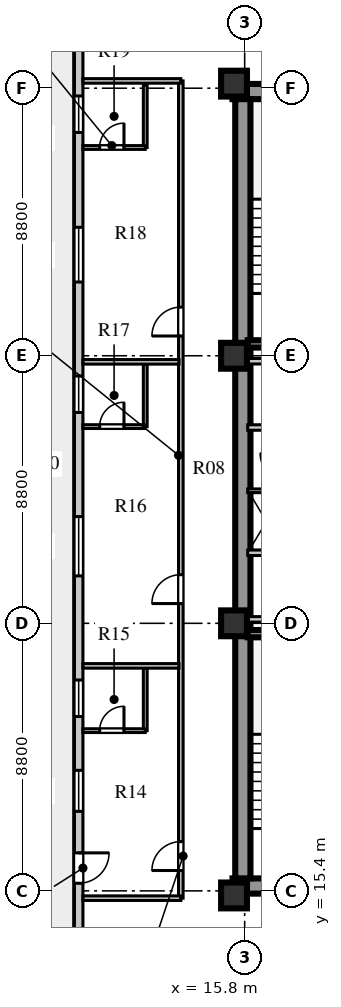
"""IFC4 building model, lengths in metres.
Left out: names, types, materials, properties, quantities, classifications, styles, units other than length and angle.
Written with IfcOpenShell. Run it as: python <this file> out.ifc"""

import sys

from ifc_helpers import new_model, si_unit, direction, frame, frame_2d, origin, origin_2d, place, context, subcontext, project, spatial, rectangle, extrude, element, fill, save


model = new_model("IFC4")
c1 = context("Model", 3, precision=1e-05, world=origin(), true_north=direction((0.0, 1.0)))
c2 = subcontext(c1, "Body", "Model", "MODEL_VIEW")
j1 = project(units=[si_unit("LENGTHUNIT", "METRE"), si_unit("PLANEANGLEUNIT", "RADIAN")], contexts=[c1])
p1 = place(None, origin())
s1 = spatial("IfcSite", under=j1, at=p1, CompositionType="ELEMENT")
p2 = place(p1, origin())
s2 = spatial("IfcBuilding", under=s1, at=p2, CompositionType="ELEMENT")
p3 = place(p2, frame((0.0, 0.0, 127.1)))
s3 = spatial("IfcBuildingStorey", under=s2, at=p3, CompositionType="ELEMENT", Elevation=127.1)
for number, where, z_axis, x_axis in (
    (1, (15.4, 15.56, 0.0), (0.0, 0.0, 1.0), (1.0, 0.0, 0.0)),
    (2, (15.4, 41.69, 0.0), (0.0, 0.0, 1.0), (1.0, 0.0, 0.0)),
):
    element("IfcWall", number, at=place(p3, frame(where, z_axis=z_axis, x_axis=x_axis)), inside=s3, PredefinedType="SHEAR", context=c2, shape_type="SweptSolid", body=[
        extrude(rectangle(XDim=9.68, YDim=0.5, at=frame_2d((4.84, 0.0))), origin(), (0.0, 0.0, 1.0), 3.6),
    ])
p4 = place(p3, frame((15.74, 15.81, 0.0), z_axis=(0.0, 0.0, 1.0), x_axis=(0.0, 1.0, 0.0)))
e3 = element("IfcWall", 3, at=p4, inside=s3, PredefinedType="SHEAR", context=c2, shape_type="SweptSolid", body=[
    extrude(rectangle(XDim=25.63, YDim=0.5, at=frame_2d((12.815, 0.0))), origin(), (0.0, 0.0, 1.0), 3.6),
])
for number, where, z_axis, x_axis in (
    (4, (15.45, 15.25, 0.0), (0.0, 0.0, 1.0), (1.0, 0.0, 0.0)),
    (5, (15.45, 24.2, 0.0), (0.0, 0.0, 1.0), (1.0, 0.0, 0.0)),
    (6, (15.45, 33.0, 0.0), (0.0, 0.0, 1.0), (1.0, 0.0, 0.0)),
    (7, (15.45, 41.95, 0.0), (0.0, 0.0, 1.0), (1.0, 0.0, 0.0)),
):
    element("IfcColumn", number, at=place(p3, frame(where, z_axis=z_axis, x_axis=x_axis)), inside=s3, PredefinedType="COLUMN", context=c2, shape_type="SweptSolid", body=[
        extrude(rectangle(XDim=0.85, YDim=0.85, at=origin_2d()), origin(), (0.0, 0.0, 1.0), 3.6),
    ])
p5 = place(p3, frame((10.34, 43.87, 0.0), z_axis=(0.0, 0.0, 1.0), x_axis=(0.0, -1.0, 0.0)))
e8 = element("IfcWall", 8, at=p5, inside=s3, PredefinedType="STANDARD", context=c2, shape_type="SweptSolid", body=[
    extrude(rectangle(XDim=30.54, YDim=0.28, at=frame_2d((15.27, 0.0))), origin(), (0.0, 0.0, 1.0), 3.6),
])
p6 = place(p5, frame((27.22, 0.0, 0.0)))
e9 = element("IfcOpeningElement", 9, at=p6, cuts=e8, PredefinedType="OPENING", context=c2, shape_type="SweptSolid", body=[
    extrude(rectangle(XDim=1.0, YDim=2.05, at=frame_2d((0.5, 1.025))), frame((0.0, 0.15, 0.0), z_axis=(0.0, -1.0, 0.0), x_axis=(1.0, 0.0, 0.0)), (0.0, 0.0, 1.0), 0.3),
])
p7 = place(p5, frame((24.505, 0.0, 0.8)))
e10 = element("IfcOpeningElement", 10, at=p7, cuts=e8, PredefinedType="OPENING", context=c2, shape_type="SweptSolid", body=[
    extrude(rectangle(XDim=1.35, YDim=1.9, at=frame_2d((0.675, 0.95))), frame((0.0, 0.15, 0.0), z_axis=(0.0, -1.0, 0.0), x_axis=(1.0, 0.0, 0.0)), (0.0, 0.0, 1.0), 0.3),
])
p8 = place(p5, frame((21.535, 0.0, 0.8)))
e11 = element("IfcOpeningElement", 11, at=p8, cuts=e8, PredefinedType="OPENING", context=c2, shape_type="SweptSolid", body=[
    extrude(rectangle(XDim=1.2, YDim=1.75, at=frame_2d((0.6, 0.875))), frame((0.0, 0.15, 0.0), z_axis=(0.0, -1.0, 0.0), x_axis=(1.0, 0.0, 0.0)), (0.0, 0.0, 1.0), 0.3),
])
p9 = place(p5, frame((16.16, 0.0, 0.8)))
e12 = element("IfcOpeningElement", 12, at=p9, cuts=e8, PredefinedType="OPENING", context=c2, shape_type="SweptSolid", body=[
    extrude(rectangle(XDim=1.95, YDim=2.0, at=frame_2d((0.975, 1.0))), frame((0.0, 0.15, 0.0), z_axis=(0.0, -1.0, 0.0), x_axis=(1.0, 0.0, 0.0)), (0.0, 0.0, 1.0), 0.3),
])
p10 = place(p5, frame((11.535, 0.0, 0.8)))
e13 = element("IfcOpeningElement", 13, at=p10, cuts=e8, PredefinedType="OPENING", context=c2, shape_type="SweptSolid", body=[
    extrude(rectangle(XDim=1.2, YDim=1.75, at=frame_2d((0.6, 0.875))), frame((0.0, 0.15, 0.0), z_axis=(0.0, -1.0, 0.0), x_axis=(1.0, 0.0, 0.0)), (0.0, 0.0, 1.0), 0.3),
])
p11 = place(p5, frame((6.645, 0.0, 0.8)))
e14 = element("IfcOpeningElement", 14, at=p11, cuts=e8, PredefinedType="OPENING", context=c2, shape_type="SweptSolid", body=[
    extrude(rectangle(XDim=1.8, YDim=2.0, at=frame_2d((0.9, 1.0))), frame((0.0, 0.15, 0.0), z_axis=(0.0, -1.0, 0.0), x_axis=(1.0, 0.0, 0.0)), (0.0, 0.0, 1.0), 0.3),
])
p12 = place(p5, frame((2.325, 0.0, 0.8)))
e15 = element("IfcOpeningElement", 15, at=p12, cuts=e8, PredefinedType="OPENING", context=c2, shape_type="SweptSolid", body=[
    extrude(rectangle(XDim=1.2, YDim=1.75, at=frame_2d((0.6, 0.875))), frame((0.0, 0.15, 0.0), z_axis=(0.0, -1.0, 0.0), x_axis=(1.0, 0.0, 0.0)), (0.0, 0.0, 1.0), 0.3),
])
p13 = place(p3, frame((15.9, 23.86, 0.0), z_axis=(0.0, 0.0, 1.0), x_axis=(1.0, 0.0, 0.0)))
e16 = element("IfcWall", 16, at=p13, inside=s3, PredefinedType="SHEAR", context=c2, shape_type="SweptSolid", body=[
    extrude(rectangle(XDim=3.52, YDim=0.24, at=frame_2d((1.76, 0.0))), origin(), (0.0, 0.0, 1.0), 3.85),
])
p14 = place(p3, frame((15.9, 26.52, 0.0), z_axis=(0.0, 0.0, 1.0), x_axis=(1.0, 0.0, 0.0)))
e17 = element("IfcWall", 17, at=p14, inside=s3, PredefinedType="SOLIDWALL", context=c2, shape_type="SweptSolid", body=[
    extrude(rectangle(XDim=8.68, YDim=0.18, at=frame_2d((4.34, 0.0))), origin(), (0.0, 0.0, 1.0), 3.6),
])
p15 = place(p14, frame((3.3, 0.0, 0.0)))
e18 = element("IfcOpeningElement", 18, at=p15, cuts=e17, PredefinedType="OPENING", context=c2, shape_type="SweptSolid", body=[
    extrude(rectangle(XDim=0.95, YDim=2.1, at=frame_2d((0.475, 1.05))), frame((0.0, 0.1, 0.0), z_axis=(0.0, -1.0, 0.0), x_axis=(1.0, 0.0, 0.0)), (0.0, 0.0, 1.0), 0.2),
])
p16 = place(p3, frame((15.9, 24.33, 0.0), z_axis=(0.0, 0.0, 1.0), x_axis=(1.0, 0.0, 0.0)))
e19 = element("IfcWall", 19, at=p16, inside=s3, PredefinedType="SOLIDWALL", context=c2, shape_type="SweptSolid", body=[
    extrude(rectangle(XDim=8.68, YDim=0.18, at=frame_2d((4.34, 0.0))), origin(), (0.0, 0.0, 1.0), 2.95),
])
p17 = place(p3, frame((15.9, 28.56, 0.0), z_axis=(0.0, 0.0, 1.0), x_axis=(1.0, 0.0, 0.0)))
e20 = element("IfcWall", 20, at=p17, inside=s3, PredefinedType="PARTITIONING", context=c2, shape_type="SweptSolid", body=[
    extrude(rectangle(XDim=1.2, YDim=0.12, at=frame_2d((0.6, 0.0))), origin(), (0.0, 0.0, 1.0), 3.6),
])
p18 = place(p3, frame((15.9, 30.64, 0.0), z_axis=(0.0, 0.0, 1.0), x_axis=(1.0, 0.0, 0.0)))
e21 = element("IfcWall", 21, at=p18, inside=s3, PredefinedType="SOLIDWALL", context=c2, shape_type="SweptSolid", body=[
    extrude(rectangle(XDim=8.68, YDim=0.18, at=frame_2d((4.34, 0.0))), origin(), (0.0, 0.0, 1.0), 3.6),
])
p19 = place(p18, frame((1.76, 0.0, 0.0)))
e22 = element("IfcOpeningElement", 22, at=p19, cuts=e21, PredefinedType="OPENING", context=c2, shape_type="SweptSolid", body=[
    extrude(rectangle(XDim=1.0, YDim=2.1, at=frame_2d((0.5, 1.05))), frame((0.0, 0.1, 0.0), z_axis=(0.0, -1.0, 0.0), x_axis=(1.0, 0.0, 0.0)), (0.0, 0.0, 1.0), 0.2),
])
p20 = place(p18, frame((3.6, 0.0, 0.0)))
e23 = element("IfcOpeningElement", 23, at=p20, cuts=e21, PredefinedType="OPENING", context=c2, shape_type="SweptSolid", body=[
    extrude(rectangle(XDim=1.0, YDim=2.1, at=frame_2d((0.5, 1.05))), frame((0.0, 0.1, 0.0), z_axis=(0.0, -1.0, 0.0), x_axis=(1.0, 0.0, 0.0)), (0.0, 0.0, 1.0), 0.2),
])
p21 = place(p18, frame((5.44, 0.0, 0.0)))
e24 = element("IfcOpeningElement", 24, at=p21, cuts=e21, PredefinedType="OPENING", context=c2, shape_type="SweptSolid", body=[
    extrude(rectangle(XDim=1.0, YDim=2.1, at=frame_2d((0.5, 1.05))), frame((0.0, 0.1, 0.0), z_axis=(0.0, -1.0, 0.0), x_axis=(1.0, 0.0, 0.0)), (0.0, 0.0, 1.0), 0.2),
])
p22 = place(p18, frame((7.28, 0.0, 0.0)))
e25 = element("IfcOpeningElement", 25, at=p22, cuts=e21, PredefinedType="OPENING", context=c2, shape_type="SweptSolid", body=[
    extrude(rectangle(XDim=1.0, YDim=2.1, at=frame_2d((0.5, 1.05))), frame((0.0, 0.1, 0.0), z_axis=(0.0, -1.0, 0.0), x_axis=(1.0, 0.0, 0.0)), (0.0, 0.0, 1.0), 0.2),
])
p23 = place(p3, frame((15.9, 32.82, 0.0), z_axis=(0.0, 0.0, 1.0), x_axis=(1.0, 0.0, 0.0)))
e26 = element("IfcWall", 26, at=p23, inside=s3, PredefinedType="SOLIDWALL", context=c2, shape_type="SweptSolid", body=[
    extrude(rectangle(XDim=8.68, YDim=0.18, at=frame_2d((4.34, 0.0))), origin(), (0.0, 0.0, 1.0), 2.95),
])
p24 = place(p3, frame((15.9, 33.39, 0.0), z_axis=(0.0, 0.0, 1.0), x_axis=(1.0, 0.0, 0.0)))
e27 = element("IfcWall", 27, at=p24, inside=s3, PredefinedType="SHEAR", context=c2, shape_type="SweptSolid", body=[
    extrude(rectangle(XDim=3.52, YDim=0.24, at=frame_2d((1.76, 0.0))), origin(), (0.0, 0.0, 1.0), 3.85),
])
p25 = place(p3, frame((13.7, 15.16, 0.0), z_axis=(0.0, 0.0, 1.0), x_axis=(0.0, 1.0, 0.0)))
e28 = element("IfcWall", 28, at=p25, inside=s3, PredefinedType="PARTITIONING", context=c2, shape_type="SweptSolid", body=[
    extrude(rectangle(XDim=26.88, YDim=0.15, at=frame_2d((13.44, 0.0))), origin(), (0.0, 0.0, 1.0), 3.6),
])
p26 = place(p25, frame((0.91, 0.0, 0.0)))
e29 = element("IfcOpeningElement", 29, at=p26, cuts=e28, PredefinedType="OPENING", context=c2, shape_type="SweptSolid", body=[
    extrude(rectangle(XDim=0.95, YDim=2.1, at=frame_2d((0.475, 1.05))), frame((0.0, 0.085, 0.0), z_axis=(0.0, -1.0, 0.0), x_axis=(1.0, 0.0, 0.0)), (0.0, 0.0, 1.0), 0.17),
])
p27 = place(p25, frame((9.69, 0.0, 0.0)))
e30 = element("IfcOpeningElement", 30, at=p27, cuts=e28, PredefinedType="OPENING", context=c2, shape_type="SweptSolid", body=[
    extrude(rectangle(XDim=0.95, YDim=2.1, at=frame_2d((0.475, 1.05))), frame((0.0, 0.085, 0.0), z_axis=(0.0, -1.0, 0.0), x_axis=(1.0, 0.0, 0.0)), (0.0, 0.0, 1.0), 0.17),
])
p28 = place(p25, frame((18.49, 0.0, 0.0)))
e31 = element("IfcOpeningElement", 31, at=p28, cuts=e28, PredefinedType="OPENING", context=c2, shape_type="SweptSolid", body=[
    extrude(rectangle(XDim=0.95, YDim=2.1, at=frame_2d((0.475, 1.05))), frame((0.0, 0.085, 0.0), z_axis=(0.0, -1.0, 0.0), x_axis=(1.0, 0.0, 0.0)), (0.0, 0.0, 1.0), 0.17),
])
for number, where, z_axis, x_axis in (
    (32, (10.48, 15.16, 0.0), (0.0, 0.0, 1.0), (1.0, 0.0, 0.0)),
    (33, (10.48, 42.04, 0.0), (0.0, 0.0, 1.0), (1.0, 0.0, 0.0)),
):
    element("IfcWall", number, at=place(p3, frame(where, z_axis=z_axis, x_axis=x_axis)), inside=s3, PredefinedType="PARTITIONING", context=c2, shape_type="SweptSolid", body=[
        extrude(rectangle(XDim=3.22, YDim=0.15, at=frame_2d((1.61, 0.0))), origin(), (0.0, 0.0, 1.0), 3.1),
    ])
p29 = place(p3, frame((12.53, 20.67, 0.0), z_axis=(0.0, 0.0, 1.0), x_axis=(0.0, 1.0, 0.0)))
e34 = element("IfcWall", 34, at=p29, inside=s3, PredefinedType="PLUMBINGWALL", context=c2, shape_type="SweptSolid", body=[
    extrude(rectangle(XDim=2.05, YDim=0.125, at=frame_2d((1.025, 0.0))), origin(), (0.0, 0.0, 1.0), 3.6),
])
p30 = place(p3, frame((10.48, 20.67, 0.0), z_axis=(0.0, 0.0, 1.0), x_axis=(1.0, 0.0, 0.0)))
e35 = element("IfcWall", 35, at=p30, inside=s3, PredefinedType="PLUMBINGWALL", context=c2, shape_type="SweptSolid", body=[
    extrude(rectangle(XDim=2.05, YDim=0.125, at=frame_2d((1.025, 0.0))), origin(), (0.0, 0.0, 1.0), 3.6),
])
p31 = place(p30, frame((0.55, 0.0, 0.0)))
e36 = element("IfcOpeningElement", 36, at=p31, cuts=e35, PredefinedType="OPENING", context=c2, shape_type="SweptSolid", body=[
    extrude(rectangle(XDim=0.8, YDim=2.05, at=frame_2d((0.4, 1.025))), frame((0.0, 0.073, 0.0), z_axis=(0.0, -1.0, 0.0), x_axis=(1.0, 0.0, 0.0)), (0.0, 0.0, 1.0), 0.145),
])
p32 = place(p3, frame((10.48, 22.8, 0.0), z_axis=(0.0, 0.0, 1.0), x_axis=(1.0, 0.0, 0.0)))
e37 = element("IfcWall", 37, at=p32, inside=s3, PredefinedType="PARTITIONING", context=c2, shape_type="SweptSolid", body=[
    extrude(rectangle(XDim=3.16, YDim=0.15, at=frame_2d((1.58, 0.0))), origin(), (0.0, 0.0, 1.0), 3.6),
])
p33 = place(p3, frame((12.53, 30.67, 0.0), z_axis=(0.0, 0.0, 1.0), x_axis=(0.0, 1.0, 0.0)))
e38 = element("IfcWall", 38, at=p33, inside=s3, PredefinedType="PLUMBINGWALL", context=c2, shape_type="SweptSolid", body=[
    extrude(rectangle(XDim=2.05, YDim=0.125, at=frame_2d((1.025, 0.0))), origin(), (0.0, 0.0, 1.0), 3.6),
])
p34 = place(p3, frame((10.48, 30.67, 0.0), z_axis=(0.0, 0.0, 1.0), x_axis=(1.0, 0.0, 0.0)))
e39 = element("IfcWall", 39, at=p34, inside=s3, PredefinedType="PLUMBINGWALL", context=c2, shape_type="SweptSolid", body=[
    extrude(rectangle(XDim=2.05, YDim=0.125, at=frame_2d((1.025, 0.0))), origin(), (0.0, 0.0, 1.0), 3.6),
])
p35 = place(p34, frame((0.55, 0.0, 0.0)))
e40 = element("IfcOpeningElement", 40, at=p35, cuts=e39, PredefinedType="OPENING", context=c2, shape_type="SweptSolid", body=[
    extrude(rectangle(XDim=0.8, YDim=2.05, at=frame_2d((0.4, 1.025))), frame((0.0, 0.073, 0.0), z_axis=(0.0, -1.0, 0.0), x_axis=(1.0, 0.0, 0.0)), (0.0, 0.0, 1.0), 0.145),
])
p36 = place(p3, frame((10.48, 32.8, 0.0), z_axis=(0.0, 0.0, 1.0), x_axis=(1.0, 0.0, 0.0)))
e41 = element("IfcWall", 41, at=p36, inside=s3, PredefinedType="PARTITIONING", context=c2, shape_type="SweptSolid", body=[
    extrude(rectangle(XDim=3.16, YDim=0.15, at=frame_2d((1.58, 0.0))), origin(), (0.0, 0.0, 1.0), 3.1),
])
p37 = place(p3, frame((12.53, 39.85, 0.0), z_axis=(0.0, 0.0, 1.0), x_axis=(0.0, 1.0, 0.0)))
e42 = element("IfcWall", 42, at=p37, inside=s3, PredefinedType="PLUMBINGWALL", context=c2, shape_type="SweptSolid", body=[
    extrude(rectangle(XDim=2.05, YDim=0.125, at=frame_2d((1.025, 0.0))), origin(), (0.0, 0.0, 1.0), 3.6),
])
p38 = place(p3, frame((10.48, 39.85, 0.0), z_axis=(0.0, 0.0, 1.0), x_axis=(1.0, 0.0, 0.0)))
e43 = element("IfcWall", 43, at=p38, inside=s3, PredefinedType="PLUMBINGWALL", context=c2, shape_type="SweptSolid", body=[
    extrude(rectangle(XDim=2.05, YDim=0.125, at=frame_2d((1.025, 0.0))), origin(), (0.0, 0.0, 1.0), 3.6),
])
p39 = place(p38, frame((0.55, 0.0, 0.0)))
e44 = element("IfcOpeningElement", 44, at=p39, cuts=e43, PredefinedType="OPENING", context=c2, shape_type="SweptSolid", body=[
    extrude(rectangle(XDim=0.8, YDim=2.05, at=frame_2d((0.4, 1.025))), frame((0.0, 0.073, 0.0), z_axis=(0.0, -1.0, 0.0), x_axis=(1.0, 0.0, 0.0)), (0.0, 0.0, 1.0), 0.145),
])
p40 = place(p6, frame((1.0, 0.0, 0.0), z_axis=(0.0, 0.0, 1.0), x_axis=(-1.0, 0.0, 0.0)))
e45 = element("IfcDoor", 45, at=p40, inside=s3, OperationType="SINGLE_SWING_RIGHT", PredefinedType="DOOR", context=c2, shape_type="SweptSolid", body=[
    extrude(rectangle(XDim=1.0, YDim=2.05, at=frame_2d((0.5, 1.025))), frame((0.0, 0.025, 0.0), z_axis=(0.0, -1.0, 0.0), x_axis=(1.0, 0.0, 0.0)), (0.0, 0.0, 1.0), 0.05),
])
fill(e9, e45)
p41 = place(p7, origin())
e46 = element("IfcWindow", 46, at=p41, inside=s3, PartitioningType="SINGLE_PANEL", PredefinedType="WINDOW", context=c2, shape_type="SweptSolid", body=[
    extrude(rectangle(XDim=1.35, YDim=1.9, at=frame_2d((0.675, 0.95))), frame((0.0, 0.03, 0.0), z_axis=(0.0, -1.0, 0.0), x_axis=(1.0, 0.0, 0.0)), (0.0, 0.0, 1.0), 0.06),
])
fill(e10, e46)
p42 = place(p8, origin())
e47 = element("IfcWindow", 47, at=p42, inside=s3, PartitioningType="SINGLE_PANEL", PredefinedType="WINDOW", context=c2, shape_type="SweptSolid", body=[
    extrude(rectangle(XDim=1.2, YDim=1.75, at=frame_2d((0.6, 0.875))), frame((0.0, 0.03, 0.0), z_axis=(0.0, -1.0, 0.0), x_axis=(1.0, 0.0, 0.0)), (0.0, 0.0, 1.0), 0.06),
])
fill(e11, e47)
p43 = place(p9, origin())
e48 = element("IfcWindow", 48, at=p43, inside=s3, PartitioningType="SINGLE_PANEL", PredefinedType="WINDOW", context=c2, shape_type="SweptSolid", body=[
    extrude(rectangle(XDim=1.95, YDim=2.0, at=frame_2d((0.975, 1.0))), frame((0.0, 0.03, 0.0), z_axis=(0.0, -1.0, 0.0), x_axis=(1.0, 0.0, 0.0)), (0.0, 0.0, 1.0), 0.06),
])
fill(e12, e48)
p44 = place(p10, origin())
e49 = element("IfcWindow", 49, at=p44, inside=s3, PartitioningType="SINGLE_PANEL", PredefinedType="WINDOW", context=c2, shape_type="SweptSolid", body=[
    extrude(rectangle(XDim=1.2, YDim=1.75, at=frame_2d((0.6, 0.875))), frame((0.0, 0.03, 0.0), z_axis=(0.0, -1.0, 0.0), x_axis=(1.0, 0.0, 0.0)), (0.0, 0.0, 1.0), 0.06),
])
fill(e13, e49)
p45 = place(p11, origin())
e50 = element("IfcWindow", 50, at=p45, inside=s3, PartitioningType="SINGLE_PANEL", PredefinedType="WINDOW", context=c2, shape_type="SweptSolid", body=[
    extrude(rectangle(XDim=1.8, YDim=2.0, at=frame_2d((0.9, 1.0))), frame((0.0, 0.03, 0.0), z_axis=(0.0, -1.0, 0.0), x_axis=(1.0, 0.0, 0.0)), (0.0, 0.0, 1.0), 0.06),
])
fill(e14, e50)
p46 = place(p12, origin())
e51 = element("IfcWindow", 51, at=p46, inside=s3, PartitioningType="SINGLE_PANEL", PredefinedType="WINDOW", context=c2, shape_type="SweptSolid", body=[
    extrude(rectangle(XDim=1.2, YDim=1.75, at=frame_2d((0.6, 0.875))), frame((0.0, 0.03, 0.0), z_axis=(0.0, -1.0, 0.0), x_axis=(1.0, 0.0, 0.0)), (0.0, 0.0, 1.0), 0.06),
])
fill(e15, e51)
p47 = place(p26, origin())
e52 = element("IfcDoor", 52, at=p47, inside=s3, OperationType="SINGLE_SWING_LEFT", PredefinedType="DOOR", context=c2, shape_type="SweptSolid", body=[
    extrude(rectangle(XDim=0.95, YDim=2.1, at=frame_2d((0.475, 1.05))), frame((0.0, 0.025, 0.0), z_axis=(0.0, -1.0, 0.0), x_axis=(1.0, 0.0, 0.0)), (0.0, 0.0, 1.0), 0.05),
])
fill(e29, e52)
p48 = place(p31, frame((0.8, 0.0, 0.0), z_axis=(0.0, 0.0, 1.0), x_axis=(-1.0, 0.0, 0.0)))
e53 = element("IfcDoor", 53, at=p48, inside=s3, OperationType="SINGLE_SWING_LEFT", PredefinedType="DOOR", context=c2, shape_type="SweptSolid", body=[
    extrude(rectangle(XDim=0.8, YDim=2.05, at=frame_2d((0.4, 1.025))), frame((0.0, 0.025, 0.0), z_axis=(0.0, -1.0, 0.0), x_axis=(1.0, 0.0, 0.0)), (0.0, 0.0, 1.0), 0.05),
])
fill(e36, e53)
p49 = place(p27, origin())
e54 = element("IfcDoor", 54, at=p49, inside=s3, OperationType="SINGLE_SWING_LEFT", PredefinedType="DOOR", context=c2, shape_type="SweptSolid", body=[
    extrude(rectangle(XDim=0.95, YDim=2.1, at=frame_2d((0.475, 1.05))), frame((0.0, 0.025, 0.0), z_axis=(0.0, -1.0, 0.0), x_axis=(1.0, 0.0, 0.0)), (0.0, 0.0, 1.0), 0.05),
])
fill(e30, e54)
p50 = place(p35, frame((0.8, 0.0, 0.0), z_axis=(0.0, 0.0, 1.0), x_axis=(-1.0, 0.0, 0.0)))
e55 = element("IfcDoor", 55, at=p50, inside=s3, OperationType="SINGLE_SWING_LEFT", PredefinedType="DOOR", context=c2, shape_type="SweptSolid", body=[
    extrude(rectangle(XDim=0.8, YDim=2.05, at=frame_2d((0.4, 1.025))), frame((0.0, 0.025, 0.0), z_axis=(0.0, -1.0, 0.0), x_axis=(1.0, 0.0, 0.0)), (0.0, 0.0, 1.0), 0.05),
])
fill(e40, e55)
p51 = place(p28, origin())
e56 = element("IfcDoor", 56, at=p51, inside=s3, OperationType="SINGLE_SWING_LEFT", PredefinedType="DOOR", context=c2, shape_type="SweptSolid", body=[
    extrude(rectangle(XDim=0.95, YDim=2.1, at=frame_2d((0.475, 1.05))), frame((0.0, 0.025, 0.0), z_axis=(0.0, -1.0, 0.0), x_axis=(1.0, 0.0, 0.0)), (0.0, 0.0, 1.0), 0.05),
])
fill(e31, e56)
p52 = place(p39, frame((0.8, 0.0, 0.0), z_axis=(0.0, 0.0, 1.0), x_axis=(-1.0, 0.0, 0.0)))
e57 = element("IfcDoor", 57, at=p52, inside=s3, OperationType="SINGLE_SWING_LEFT", PredefinedType="DOOR", context=c2, shape_type="SweptSolid", body=[
    extrude(rectangle(XDim=0.8, YDim=2.05, at=frame_2d((0.4, 1.025))), frame((0.0, 0.025, 0.0), z_axis=(0.0, -1.0, 0.0), x_axis=(1.0, 0.0, 0.0)), (0.0, 0.0, 1.0), 0.05),
])
fill(e44, e57)
save(model, sys.argv[1])
